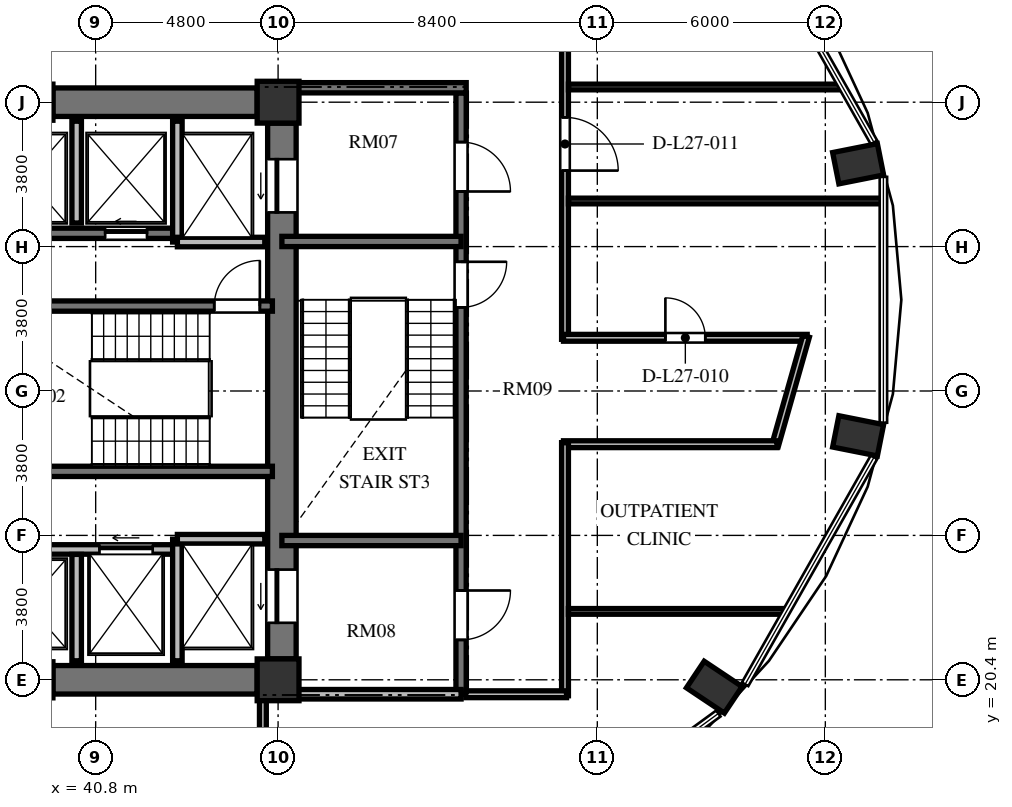
"""IFC4 building model, lengths in metres.
Left out: names, types, materials, properties, quantities, classifications, styles, units other than length and angle.
Written with IfcOpenShell. Run it as: python <this file> out.ifc"""

import sys

from ifc_helpers import new_model, si_unit, direction, frame, frame_2d, origin, origin_2d, place, context, subcontext, project, spatial, rectangle, extrude, element, fill, save


model = new_model("IFC4")
c1 = context("Model", 3, precision=1e-05, world=origin(), true_north=direction((0.0, 1.0)))
c2 = subcontext(c1, "Body", "Model", "MODEL_VIEW")
j1 = project(units=[si_unit("LENGTHUNIT", "METRE"), si_unit("PLANEANGLEUNIT", "RADIAN")], contexts=[c1])
p1 = place(None, origin())
s1 = spatial("IfcSite", under=j1, at=p1, CompositionType="ELEMENT")
p2 = place(p1, origin())
s2 = spatial("IfcBuilding", under=s1, at=p2, CompositionType="ELEMENT")
p3 = place(p2, frame((0.0, 0.0, 107.28)))
s3 = spatial("IfcBuildingStorey", under=s2, at=p3, CompositionType="ELEMENT", Elevation=107.28)
for number, where, z_axis, x_axis in (
    (1, (57.078, 20.205, 0.0), (0.0, 0.0, 1.0), (0.831, -0.556, 0.0)),
    (2, (60.863, 26.82, 0.0), (0.0, 0.0, 1.0), (0.981, -0.195, 0.0)),
    (3, (60.863, 33.98, 0.0), (0.0, 0.0, 1.0), (0.981, 0.195, 0.0)),
):
    element("IfcColumn", number, at=place(p3, frame(where, z_axis=z_axis, x_axis=x_axis)), inside=s3, PredefinedType="COLUMN", context=c2, shape_type="SweptSolid", body=[
        extrude(rectangle(XDim=1.2, YDim=0.84, at=origin_2d()), origin(), (0.0, 0.0, 1.0), 3.648),
    ])
p4 = place(p3, frame((39.2, 20.4, 0.0), z_axis=(0.0, 0.0, 1.0), x_axis=(1.0, 0.0, 0.0)))
e4 = element("IfcColumn", 4, at=p4, inside=s3, PredefinedType="COLUMN", context=c2, shape_type="SweptSolid", body=[
    extrude(rectangle(XDim=0.95, YDim=0.95, at=origin_2d()), origin(), (0.0, 0.0, 1.0), 3.648),
])
for number, where, z_axis, x_axis in (
    (5, (45.6, 20.4, 0.0), (0.0, 0.0, 1.0), (1.0, 0.0, 0.0)),
    (6, (45.6, 35.6, 0.0), (0.0, 0.0, 1.0), (1.0, 0.0, 0.0)),
):
    element("IfcColumn", number, at=place(p3, frame(where, z_axis=z_axis, x_axis=x_axis)), inside=s3, PredefinedType="COLUMN", context=c2, shape_type="SweptSolid", body=[
        extrude(rectangle(XDim=1.1, YDim=1.1, at=origin_2d()), origin(), (0.0, 0.0, 1.0), 3.648),
    ])
p5 = place(p3, frame((39.2, 35.6, 0.0), z_axis=(0.0, 0.0, 1.0), x_axis=(1.0, 0.0, 0.0)))
e7 = element("IfcColumn", 7, at=p5, inside=s3, PredefinedType="COLUMN", context=c2, shape_type="SweptSolid", body=[
    extrude(rectangle(XDim=0.95, YDim=0.95, at=origin_2d()), origin(), (0.0, 0.0, 1.0), 3.648),
])
p6 = place(p3, frame((45.7, 20.95, 0.0), z_axis=(0.0, 0.0, 1.0), x_axis=(0.0, 1.0, 0.0)))
e8 = element("IfcWall", 8, at=p6, inside=s3, PredefinedType="SHEAR", context=c2, shape_type="SweptSolid", body=[
    extrude(rectangle(XDim=14.1, YDim=0.75, at=frame_2d((7.05, 0.0))), origin(), (0.0, 0.0, 1.0), 3.648),
])
p7 = place(p6, frame((11.75, 0.0, 0.0)))
e9 = element("IfcOpeningElement", 9, at=p7, cuts=e8, PredefinedType="OPENING", context=c2, shape_type="SweptSolid", body=[
    extrude(rectangle(XDim=1.4, YDim=2.3, at=frame_2d((0.7, 1.15))), frame((0.0, 0.385, 0.0), z_axis=(0.0, -1.0, 0.0), x_axis=(1.0, 0.0, 0.0)), (0.0, 0.0, 1.0), 0.77),
])
p8 = place(p6, frame((0.95, 0.0, 0.0)))
e10 = element("IfcOpeningElement", 10, at=p8, cuts=e8, PredefinedType="OPENING", context=c2, shape_type="SweptSolid", body=[
    extrude(rectangle(XDim=1.4, YDim=2.3, at=frame_2d((0.7, 1.15))), frame((0.0, 0.385, 0.0), z_axis=(0.0, -1.0, 0.0), x_axis=(1.0, 0.0, 0.0)), (0.0, 0.0, 1.0), 0.77),
])
for number, where, z_axis, x_axis in (
    (11, (39.675, 20.4, 0.0), (0.0, 0.0, 1.0), (1.0, 0.0, 0.0)),
    (12, (39.675, 35.6, 0.0), (0.0, 0.0, 1.0), (1.0, 0.0, 0.0)),
):
    element("IfcWall", number, at=place(p3, frame(where, z_axis=z_axis, x_axis=x_axis)), inside=s3, PredefinedType="SHEAR", context=c2, shape_type="SweptSolid", body=[
        extrude(rectangle(XDim=5.375, YDim=0.75, at=frame_2d((2.688, 0.0))), origin(), (0.0, 0.0, 1.0), 3.648),
    ])
p9 = place(p3, frame((37.465, 30.235, 0.0), z_axis=(0.0, 0.0, 1.0), x_axis=(1.0, 0.0, 0.0)))
e13 = element("IfcWall", 13, at=p9, inside=s3, PredefinedType="SHEAR", context=c2, shape_type="SweptSolid", body=[
    extrude(rectangle(XDim=7.985, YDim=0.27, at=frame_2d((3.992, 0.0))), origin(), (0.0, 0.0, 1.0), 3.648),
])
p10 = place(p9, frame((6.455, 0.0, 0.0)))
e14 = element("IfcOpeningElement", 14, at=p10, cuts=e13, PredefinedType="OPENING", context=c2, shape_type="SweptSolid", body=[
    extrude(rectangle(XDim=1.2, YDim=2.15, at=frame_2d((0.6, 1.075))), frame((0.0, 0.145, 0.0), z_axis=(0.0, -1.0, 0.0), x_axis=(1.0, 0.0, 0.0)), (0.0, 0.0, 1.0), 0.29),
])
p11 = place(p3, frame((37.465, 25.885, 0.0), z_axis=(0.0, 0.0, 1.0), x_axis=(1.0, 0.0, 0.0)))
e15 = element("IfcWall", 15, at=p11, inside=s3, PredefinedType="SHEAR", context=c2, shape_type="SweptSolid", body=[
    extrude(rectangle(XDim=7.985, YDim=0.27, at=frame_2d((3.992, 0.0))), origin(), (0.0, 0.0, 1.0), 3.648),
])
p12 = place(p3, frame((26.55, 32.15, 0.0), z_axis=(0.0, 0.0, 1.0), x_axis=(1.0, 0.0, 0.0)))
e16 = element("IfcWall", 16, at=p12, inside=s3, PredefinedType="SHEAR", context=c2, shape_type="SweptSolid", body=[
    extrude(rectangle(XDim=16.4, YDim=0.27, at=frame_2d((8.2, 0.0))), origin(), (0.0, 0.0, 1.0), 3.648),
])
p13 = place(p12, frame((1.1, 0.0, 0.0)))
e17 = element("IfcOpeningElement", 17, at=p13, cuts=e16, PredefinedType="OPENING", context=c2, shape_type="SweptSolid", body=[
    extrude(rectangle(XDim=1.1, YDim=2.2, at=frame_2d((0.55, 1.1))), frame((0.0, 0.145, 0.0), z_axis=(0.0, -1.0, 0.0), x_axis=(1.0, 0.0, 0.0)), (0.0, 0.0, 1.0), 0.29),
])
p14 = place(p12, frame((3.7, 0.0, 0.0)))
e18 = element("IfcOpeningElement", 18, at=p14, cuts=e16, PredefinedType="OPENING", context=c2, shape_type="SweptSolid", body=[
    extrude(rectangle(XDim=1.1, YDim=2.2, at=frame_2d((0.55, 1.1))), frame((0.0, 0.145, 0.0), z_axis=(0.0, -1.0, 0.0), x_axis=(1.0, 0.0, 0.0)), (0.0, 0.0, 1.0), 0.29),
])
p15 = place(p12, frame((6.5, 0.0, 0.0)))
e19 = element("IfcOpeningElement", 19, at=p15, cuts=e16, PredefinedType="OPENING", context=c2, shape_type="SweptSolid", body=[
    extrude(rectangle(XDim=1.1, YDim=2.2, at=frame_2d((0.55, 1.1))), frame((0.0, 0.145, 0.0), z_axis=(0.0, -1.0, 0.0), x_axis=(1.0, 0.0, 0.0)), (0.0, 0.0, 1.0), 0.29),
])
p16 = place(p12, frame((9.1, 0.0, 0.0)))
e20 = element("IfcOpeningElement", 20, at=p16, cuts=e16, PredefinedType="OPENING", context=c2, shape_type="SweptSolid", body=[
    extrude(rectangle(XDim=1.1, YDim=2.2, at=frame_2d((0.55, 1.1))), frame((0.0, 0.145, 0.0), z_axis=(0.0, -1.0, 0.0), x_axis=(1.0, 0.0, 0.0)), (0.0, 0.0, 1.0), 0.29),
])
p17 = place(p12, frame((11.9, 0.0, 0.0)))
e21 = element("IfcOpeningElement", 21, at=p17, cuts=e16, PredefinedType="OPENING", context=c2, shape_type="SweptSolid", body=[
    extrude(rectangle(XDim=1.1, YDim=2.2, at=frame_2d((0.55, 1.1))), frame((0.0, 0.145, 0.0), z_axis=(0.0, -1.0, 0.0), x_axis=(1.0, 0.0, 0.0)), (0.0, 0.0, 1.0), 0.29),
])
p18 = place(p12, frame((14.5, 0.0, 0.0)))
e22 = element("IfcOpeningElement", 22, at=p18, cuts=e16, PredefinedType="OPENING", context=c2, shape_type="SweptSolid", body=[
    extrude(rectangle(XDim=1.1, YDim=2.2, at=frame_2d((0.55, 1.1))), frame((0.0, 0.145, 0.0), z_axis=(0.0, -1.0, 0.0), x_axis=(1.0, 0.0, 0.0)), (0.0, 0.0, 1.0), 0.29),
])
p19 = place(p3, frame((26.75, 23.83, 0.0), z_axis=(0.0, 0.0, 1.0), x_axis=(1.0, 0.0, 0.0)))
e23 = element("IfcWall", 23, at=p19, inside=s3, PredefinedType="SOLIDWALL", context=c2, shape_type="SweptSolid", body=[
    extrude(rectangle(XDim=16.2, YDim=0.25, at=frame_2d((8.1, 0.0))), origin(), (0.0, 0.0, 1.0), 3.428),
])
p20 = place(p19, frame((0.9, 0.0, 0.0)))
e24 = element("IfcOpeningElement", 24, at=p20, cuts=e23, PredefinedType="OPENING", context=c2, shape_type="SweptSolid", body=[
    extrude(rectangle(XDim=1.1, YDim=2.2, at=frame_2d((0.55, 1.1))), frame((0.0, 0.135, 0.0), z_axis=(0.0, -1.0, 0.0), x_axis=(1.0, 0.0, 0.0)), (0.0, 0.0, 1.0), 0.27),
])
p21 = place(p19, frame((3.5, 0.0, 0.0)))
e25 = element("IfcOpeningElement", 25, at=p21, cuts=e23, PredefinedType="OPENING", context=c2, shape_type="SweptSolid", body=[
    extrude(rectangle(XDim=1.1, YDim=2.2, at=frame_2d((0.55, 1.1))), frame((0.0, 0.135, 0.0), z_axis=(0.0, -1.0, 0.0), x_axis=(1.0, 0.0, 0.0)), (0.0, 0.0, 1.0), 0.27),
])
p22 = place(p19, frame((6.3, 0.0, 0.0)))
e26 = element("IfcOpeningElement", 26, at=p22, cuts=e23, PredefinedType="OPENING", context=c2, shape_type="SweptSolid", body=[
    extrude(rectangle(XDim=1.1, YDim=2.2, at=frame_2d((0.55, 1.1))), frame((0.0, 0.135, 0.0), z_axis=(0.0, -1.0, 0.0), x_axis=(1.0, 0.0, 0.0)), (0.0, 0.0, 1.0), 0.27),
])
p23 = place(p19, frame((8.9, 0.0, 0.0)))
e27 = element("IfcOpeningElement", 27, at=p23, cuts=e23, PredefinedType="OPENING", context=c2, shape_type="SweptSolid", body=[
    extrude(rectangle(XDim=1.1, YDim=2.2, at=frame_2d((0.55, 1.1))), frame((0.0, 0.135, 0.0), z_axis=(0.0, -1.0, 0.0), x_axis=(1.0, 0.0, 0.0)), (0.0, 0.0, 1.0), 0.27),
])
p24 = place(p19, frame((11.7, 0.0, 0.0)))
e28 = element("IfcOpeningElement", 28, at=p24, cuts=e23, PredefinedType="OPENING", context=c2, shape_type="SweptSolid", body=[
    extrude(rectangle(XDim=1.1, YDim=2.2, at=frame_2d((0.55, 1.1))), frame((0.0, 0.135, 0.0), z_axis=(0.0, -1.0, 0.0), x_axis=(1.0, 0.0, 0.0)), (0.0, 0.0, 1.0), 0.27),
])
p25 = place(p19, frame((14.15, 0.0, 0.0)))
e29 = element("IfcOpeningElement", 29, at=p25, cuts=e23, PredefinedType="OPENING", context=c2, shape_type="SweptSolid", body=[
    extrude(rectangle(XDim=1.4, YDim=2.3, at=frame_2d((0.7, 1.15))), frame((0.0, 0.135, 0.0), z_axis=(0.0, -1.0, 0.0), x_axis=(1.0, 0.0, 0.0)), (0.0, 0.0, 1.0), 0.27),
])
p26 = place(p3, frame((42.95, 31.92, 0.0), z_axis=(0.0, 0.0, 1.0), x_axis=(0.0, 1.0, 0.0)))
e30 = element("IfcWall", 30, at=p26, inside=s3, PredefinedType="SOLIDWALL", context=c2, shape_type="SweptSolid", body=[
    extrude(rectangle(XDim=3.18, YDim=0.25, at=frame_2d((1.59, 0.0))), origin(), (0.0, 0.0, 1.0), 3.428),
])
p27 = place(p3, frame((42.95, 31.92, 0.0), z_axis=(0.0, 0.0, 1.0), x_axis=(1.0, 0.0, 0.0)))
e31 = element("IfcWall", 31, at=p27, inside=s3, PredefinedType="SOLIDWALL", context=c2, shape_type="SweptSolid", body=[
    extrude(rectangle(XDim=2.3, YDim=0.25, at=frame_2d((1.15, 0.0))), origin(), (0.0, 0.0, 1.0), 3.428),
])
p28 = place(p3, frame((42.95, 20.9, 0.0), z_axis=(0.0, 0.0, 1.0), x_axis=(0.0, 1.0, 0.0)))
e32 = element("IfcWall", 32, at=p28, inside=s3, PredefinedType="SOLIDWALL", context=c2, shape_type="SweptSolid", body=[
    extrude(rectangle(XDim=3.2, YDim=0.25, at=frame_2d((1.6, 0.0))), origin(), (0.0, 0.0, 1.0), 3.428),
])
p29 = place(p3, frame((42.95, 24.1, 0.0), z_axis=(0.0, 0.0, 1.0), x_axis=(1.0, 0.0, 0.0)))
e33 = element("IfcWall", 33, at=p29, inside=s3, PredefinedType="SOLIDWALL", context=c2, shape_type="SweptSolid", body=[
    extrude(rectangle(XDim=2.3, YDim=0.25, at=frame_2d((1.15, 0.0))), origin(), (0.0, 0.0, 1.0), 3.428),
])
p30 = place(p3, frame((40.3, 32.42, 0.0), z_axis=(0.0, 0.0, 1.0), x_axis=(0.0, 1.0, 0.0)))
e34 = element("IfcWall", 34, at=p30, inside=s3, PredefinedType="SOLIDWALL", context=c2, shape_type="SweptSolid", body=[
    extrude(rectangle(XDim=2.68, YDim=0.25, at=frame_2d((1.34, 0.0))), origin(), (0.0, 0.0, 1.0), 3.428),
])
p31 = place(p3, frame((40.3, 20.9, 0.0), z_axis=(0.0, 0.0, 1.0), x_axis=(0.0, 1.0, 0.0)))
e35 = element("IfcWall", 35, at=p31, inside=s3, PredefinedType="SOLIDWALL", context=c2, shape_type="SweptSolid", body=[
    extrude(rectangle(XDim=2.8, YDim=0.25, at=frame_2d((1.4, 0.0))), origin(), (0.0, 0.0, 1.0), 3.428),
])
p32 = place(p3, frame((50.415, 35.845, 0.0), z_axis=(0.0, 0.0, 1.0), x_axis=(0.0, -1.0, 0.0)))
e36 = element("IfcWall", 36, at=p32, inside=s3, PredefinedType="SHEAR", context=c2, shape_type="SweptSolid", body=[
    extrude(rectangle(XDim=15.825, YDim=0.27, at=frame_2d((7.913, 0.0))), origin(), (0.0, 0.0, 1.0), 3.648),
])
p33 = place(p32, frame((4.445, 0.0, 0.0)))
e37 = element("IfcOpeningElement", 37, at=p33, cuts=e36, PredefinedType="OPENING", context=c2, shape_type="SweptSolid", body=[
    extrude(rectangle(XDim=1.2, YDim=2.15, at=frame_2d((0.6, 1.075))), frame((0.0, 0.145, 0.0), z_axis=(0.0, -1.0, 0.0), x_axis=(1.0, 0.0, 0.0)), (0.0, 0.0, 1.0), 0.29),
])
p34 = place(p32, frame((1.295, 0.0, 0.0)))
e38 = element("IfcOpeningElement", 38, at=p34, cuts=e36, PredefinedType="OPENING", context=c2, shape_type="SweptSolid", body=[
    extrude(rectangle(XDim=1.3, YDim=2.2, at=frame_2d((0.65, 1.1))), frame((0.0, 0.145, 0.0), z_axis=(0.0, -1.0, 0.0), x_axis=(1.0, 0.0, 0.0)), (0.0, 0.0, 1.0), 0.29),
])
p35 = place(p32, frame((13.095, 0.0, 0.0)))
e39 = element("IfcOpeningElement", 39, at=p35, cuts=e36, PredefinedType="OPENING", context=c2, shape_type="SweptSolid", body=[
    extrude(rectangle(XDim=1.3, YDim=2.2, at=frame_2d((0.65, 1.1))), frame((0.0, 0.145, 0.0), z_axis=(0.0, -1.0, 0.0), x_axis=(1.0, 0.0, 0.0)), (0.0, 0.0, 1.0), 0.29),
])
p36 = place(p3, frame((46.075, 35.98, 0.0), z_axis=(0.0, 0.0, 1.0), x_axis=(1.0, 0.0, 0.0)))
e40 = element("IfcWall", 40, at=p36, inside=s3, PredefinedType="SHEAR", context=c2, shape_type="SweptSolid", body=[
    extrude(rectangle(XDim=4.475, YDim=0.27, at=frame_2d((2.238, 0.0))), origin(), (0.0, 0.0, 1.0), 3.648),
])
for number, where, z_axis, x_axis in (
    (41, (45.7, 31.935, 0.0), (0.0, 0.0, 1.0), (1.0, 0.0, 0.0)),
    (42, (45.7, 24.065, 0.0), (0.0, 0.0, 1.0), (1.0, 0.0, 0.0)),
):
    element("IfcWall", number, at=place(p3, frame(where, z_axis=z_axis, x_axis=x_axis)), inside=s3, PredefinedType="SHEAR", context=c2, shape_type="SweptSolid", body=[
        extrude(rectangle(XDim=4.715, YDim=0.27, at=frame_2d((2.357, 0.0))), origin(), (0.0, 0.0, 1.0), 3.648),
    ])
p37 = place(p3, frame((45.7, 20.02, 0.0), z_axis=(0.0, 0.0, 1.0), x_axis=(1.0, 0.0, 0.0)))
e43 = element("IfcWall", 43, at=p37, inside=s3, PredefinedType="SOLIDWALL", context=c2, shape_type="SweptSolid", body=[
    extrude(rectangle(XDim=4.715, YDim=0.25, at=frame_2d((2.357, 0.0))), origin(), (0.0, 0.0, 1.0), 3.428),
])
p38 = place(p3, frame((53.15, 38.79, 0.0), z_axis=(0.0, 0.0, 1.0), x_axis=(0.0, -1.0, 0.0)))
e44 = element("IfcWall", 44, at=p38, inside=s3, PredefinedType="PARTITIONING", context=c2, shape_type="SweptSolid", body=[
    extrude(rectangle(XDim=9.43, YDim=0.18, at=frame_2d((4.715, 0.0))), origin(), (0.0, 0.0, 1.0), 3.428),
])
p39 = place(p38, frame((3.59, 0.0, 0.0)))
e45 = element("IfcOpeningElement", 45, at=p39, cuts=e44, PredefinedType="OPENING", context=c2, shape_type="SweptSolid", body=[
    extrude(rectangle(XDim=1.4, YDim=2.2, at=frame_2d((0.7, 1.1))), frame((0.0, 0.1, 0.0), z_axis=(0.0, -1.0, 0.0), x_axis=(1.0, 0.0, 0.0)), (0.0, 0.0, 1.0), 0.2),
])
p40 = place(p3, frame((53.11, 29.4, 0.0), z_axis=(0.0, 0.0, 1.0), x_axis=(1.0, 0.0, 0.0)))
e46 = element("IfcWall", 46, at=p40, inside=s3, PredefinedType="PARTITIONING", context=c2, shape_type="SweptSolid", body=[
    extrude(rectangle(XDim=6.413, YDim=0.18, at=frame_2d((3.206, 0.0))), origin(), (0.0, 0.0, 1.0), 3.428),
])
p41 = place(p40, frame((2.681, 0.0, 0.0)))
e47 = element("IfcOpeningElement", 47, at=p41, cuts=e46, PredefinedType="OPENING", context=c2, shape_type="SweptSolid", body=[
    extrude(rectangle(XDim=1.05, YDim=2.15, at=frame_2d((0.525, 1.075))), frame((0.0, 0.1, 0.0), z_axis=(0.0, -1.0, 0.0), x_axis=(1.0, 0.0, 0.0)), (0.0, 0.0, 1.0), 0.2),
])
p42 = place(p3, frame((59.494, 29.438, 0.0), z_axis=(0.0, 0.0, 1.0), x_axis=(-0.273222154729, -0.961950962453, 0.0)))
e48 = element("IfcWall", 48, at=p42, inside=s3, PredefinedType="PARTITIONING", context=c2, shape_type="SweptSolid", body=[
    extrude(rectangle(XDim=2.991, YDim=0.18, at=frame_2d((1.495, 0.0))), origin(), (0.0, 0.0, 1.0), 3.428),
])
p43 = place(p3, frame((58.727, 26.6, 0.0), z_axis=(0.0, 0.0, 1.0), x_axis=(-1.0, 0.0, 0.0)))
e49 = element("IfcWall", 49, at=p43, inside=s3, PredefinedType="PARTITIONING", context=c2, shape_type="SweptSolid", body=[
    extrude(rectangle(XDim=5.617, YDim=0.18, at=frame_2d((2.809, 0.0))), origin(), (0.0, 0.0, 1.0), 3.428),
])
p44 = place(p3, frame((53.15, 26.64, 0.0), z_axis=(0.0, 0.0, 1.0), x_axis=(0.0, -1.0, 0.0)))
e50 = element("IfcWall", 50, at=p44, inside=s3, PredefinedType="PARTITIONING", context=c2, shape_type="SweptSolid", body=[
    extrude(rectangle(XDim=6.66, YDim=0.18, at=frame_2d((3.33, 0.0))), origin(), (0.0, 0.0, 1.0), 3.428),
])
p45 = place(p3, frame((53.19, 20.02, 0.0), z_axis=(0.0, 0.0, 1.0), x_axis=(-1.0, 0.0, 0.0)))
e51 = element("IfcWall", 51, at=p45, inside=s3, PredefinedType="PARTITIONING", context=c2, shape_type="SweptSolid", body=[
    extrude(rectangle(XDim=2.65, YDim=0.18, at=frame_2d((1.325, 0.0))), origin(), (0.0, 0.0, 1.0), 3.428),
])
p46 = place(p3, frame((45.2, 19.91, 0.0), z_axis=(0.0, 0.0, 1.0), x_axis=(0.0, -1.0, 0.0)))
e52 = element("IfcWall", 52, at=p46, inside=s3, PredefinedType="PARTITIONING", context=c2, shape_type="SweptSolid", body=[
    extrude(rectangle(XDim=2.55, YDim=0.18, at=frame_2d((1.275, 0.0))), origin(), (0.0, 0.0, 1.0), 3.428),
])
p47 = place(p3, frame((53.24, 22.2, 0.0), z_axis=(0.0, 0.0, 1.0), x_axis=(1.0, 0.0, 0.0)))
e53 = element("IfcWall", 53, at=p47, inside=s3, PredefinedType="PARTITIONING", context=c2, shape_type="SweptSolid", body=[
    extrude(rectangle(XDim=5.731, YDim=0.15, at=frame_2d((2.866, 0.0))), origin(), (0.0, 0.0, 1.0), 3.428),
])
p48 = place(p3, frame((53.24, 33.0, 0.0), z_axis=(0.0, 0.0, 1.0), x_axis=(1.0, 0.0, 0.0)))
e54 = element("IfcWall", 54, at=p48, inside=s3, PredefinedType="PARTITIONING", context=c2, shape_type="SweptSolid", body=[
    extrude(rectangle(XDim=8.28, YDim=0.15, at=frame_2d((4.14, 0.0))), origin(), (0.0, 0.0, 1.0), 3.428),
])
p49 = place(p3, frame((53.24, 36.0, 0.0), z_axis=(0.0, 0.0, 1.0), x_axis=(1.0, 0.0, 0.0)))
e55 = element("IfcWall", 55, at=p49, inside=s3, PredefinedType="PARTITIONING", context=c2, shape_type="SweptSolid", body=[
    extrude(rectangle(XDim=7.207, YDim=0.15, at=frame_2d((3.604, 0.0))), origin(), (0.0, 0.0, 1.0), 3.428),
])
p50 = place(p10, origin())
e56 = element("IfcDoor", 56, at=p50, inside=s3, OperationType="SINGLE_SWING_RIGHT", PredefinedType="DOOR", context=c2, shape_type="SweptSolid", body=[
    extrude(rectangle(XDim=1.2, YDim=2.15, at=frame_2d((0.6, 1.075))), frame((0.0, 0.025, 0.0), z_axis=(0.0, -1.0, 0.0), x_axis=(1.0, 0.0, 0.0)), (0.0, 0.0, 1.0), 0.05),
])
fill(e14, e56)
p51 = place(p18, origin())
e57 = element("IfcDoor", 57, at=p51, inside=s3, OperationType="SLIDING_TO_LEFT", PredefinedType="DOOR", context=c2, shape_type="SweptSolid", body=[
    extrude(rectangle(XDim=1.1, YDim=2.2, at=frame_2d((0.55, 1.1))), frame((0.0, 0.025, 0.0), z_axis=(0.0, -1.0, 0.0), x_axis=(1.0, 0.0, 0.0)), (0.0, 0.0, 1.0), 0.05),
])
fill(e22, e57)
p52 = place(p7, origin())
e58 = element("IfcDoor", 58, at=p52, inside=s3, OperationType="SLIDING_TO_LEFT", PredefinedType="DOOR", context=c2, shape_type="SweptSolid", body=[
    extrude(rectangle(XDim=1.4, YDim=2.3, at=frame_2d((0.7, 1.15))), frame((0.0, 0.025, 0.0), z_axis=(0.0, -1.0, 0.0), x_axis=(1.0, 0.0, 0.0)), (0.0, 0.0, 1.0), 0.05),
])
fill(e9, e58)
p53 = place(p8, origin())
e59 = element("IfcDoor", 59, at=p53, inside=s3, OperationType="SLIDING_TO_LEFT", PredefinedType="DOOR", context=c2, shape_type="SweptSolid", body=[
    extrude(rectangle(XDim=1.4, YDim=2.3, at=frame_2d((0.7, 1.15))), frame((0.0, 0.025, 0.0), z_axis=(0.0, -1.0, 0.0), x_axis=(1.0, 0.0, 0.0)), (0.0, 0.0, 1.0), 0.05),
])
fill(e10, e59)
p54 = place(p25, origin())
e60 = element("IfcDoor", 60, at=p54, inside=s3, OperationType="SLIDING_TO_LEFT", PredefinedType="DOOR", context=c2, shape_type="SweptSolid", body=[
    extrude(rectangle(XDim=1.4, YDim=2.3, at=frame_2d((0.7, 1.15))), frame((0.0, 0.025, 0.0), z_axis=(0.0, -1.0, 0.0), x_axis=(1.0, 0.0, 0.0)), (0.0, 0.0, 1.0), 0.05),
])
fill(e29, e60)
p55 = place(p33, origin())
e61 = element("IfcDoor", 61, at=p55, inside=s3, OperationType="SINGLE_SWING_LEFT", PredefinedType="DOOR", context=c2, shape_type="SweptSolid", body=[
    extrude(rectangle(XDim=1.2, YDim=2.15, at=frame_2d((0.6, 1.075))), frame((0.0, 0.025, 0.0), z_axis=(0.0, -1.0, 0.0), x_axis=(1.0, 0.0, 0.0)), (0.0, 0.0, 1.0), 0.05),
])
fill(e37, e61)
p56 = place(p34, origin())
e62 = element("IfcDoor", 62, at=p56, inside=s3, OperationType="SINGLE_SWING_RIGHT", PredefinedType="DOOR", context=c2, shape_type="SweptSolid", body=[
    extrude(rectangle(XDim=1.3, YDim=2.2, at=frame_2d((0.65, 1.1))), frame((0.0, 0.025, 0.0), z_axis=(0.0, -1.0, 0.0), x_axis=(1.0, 0.0, 0.0)), (0.0, 0.0, 1.0), 0.05),
])
fill(e38, e62)
p57 = place(p35, origin())
e63 = element("IfcDoor", 63, at=p57, inside=s3, OperationType="SINGLE_SWING_LEFT", PredefinedType="DOOR", context=c2, shape_type="SweptSolid", body=[
    extrude(rectangle(XDim=1.3, YDim=2.2, at=frame_2d((0.65, 1.1))), frame((0.0, 0.025, 0.0), z_axis=(0.0, -1.0, 0.0), x_axis=(1.0, 0.0, 0.0)), (0.0, 0.0, 1.0), 0.05),
])
fill(e39, e63)
p58 = place(p41, origin())
e64 = element("IfcDoor", 64, at=p58, inside=s3, OperationType="SINGLE_SWING_LEFT", PredefinedType="DOOR", context=c2, shape_type="SweptSolid", body=[
    extrude(rectangle(XDim=1.05, YDim=2.15, at=frame_2d((0.525, 1.075))), frame((0.0, 0.025, 0.0), z_axis=(0.0, -1.0, 0.0), x_axis=(1.0, 0.0, 0.0)), (0.0, 0.0, 1.0), 0.05),
])
fill(e47, e64)
p59 = place(p39, origin())
e65 = element("IfcDoor", 65, at=p59, inside=s3, OperationType="SINGLE_SWING_RIGHT", PredefinedType="DOOR", context=c2, shape_type="SweptSolid", body=[
    extrude(rectangle(XDim=1.4, YDim=2.2, at=frame_2d((0.7, 1.1))), frame((0.0, 0.025, 0.0), z_axis=(0.0, -1.0, 0.0), x_axis=(1.0, 0.0, 0.0)), (0.0, 0.0, 1.0), 0.05),
])
fill(e45, e65)
save(model, sys.argv[1])
